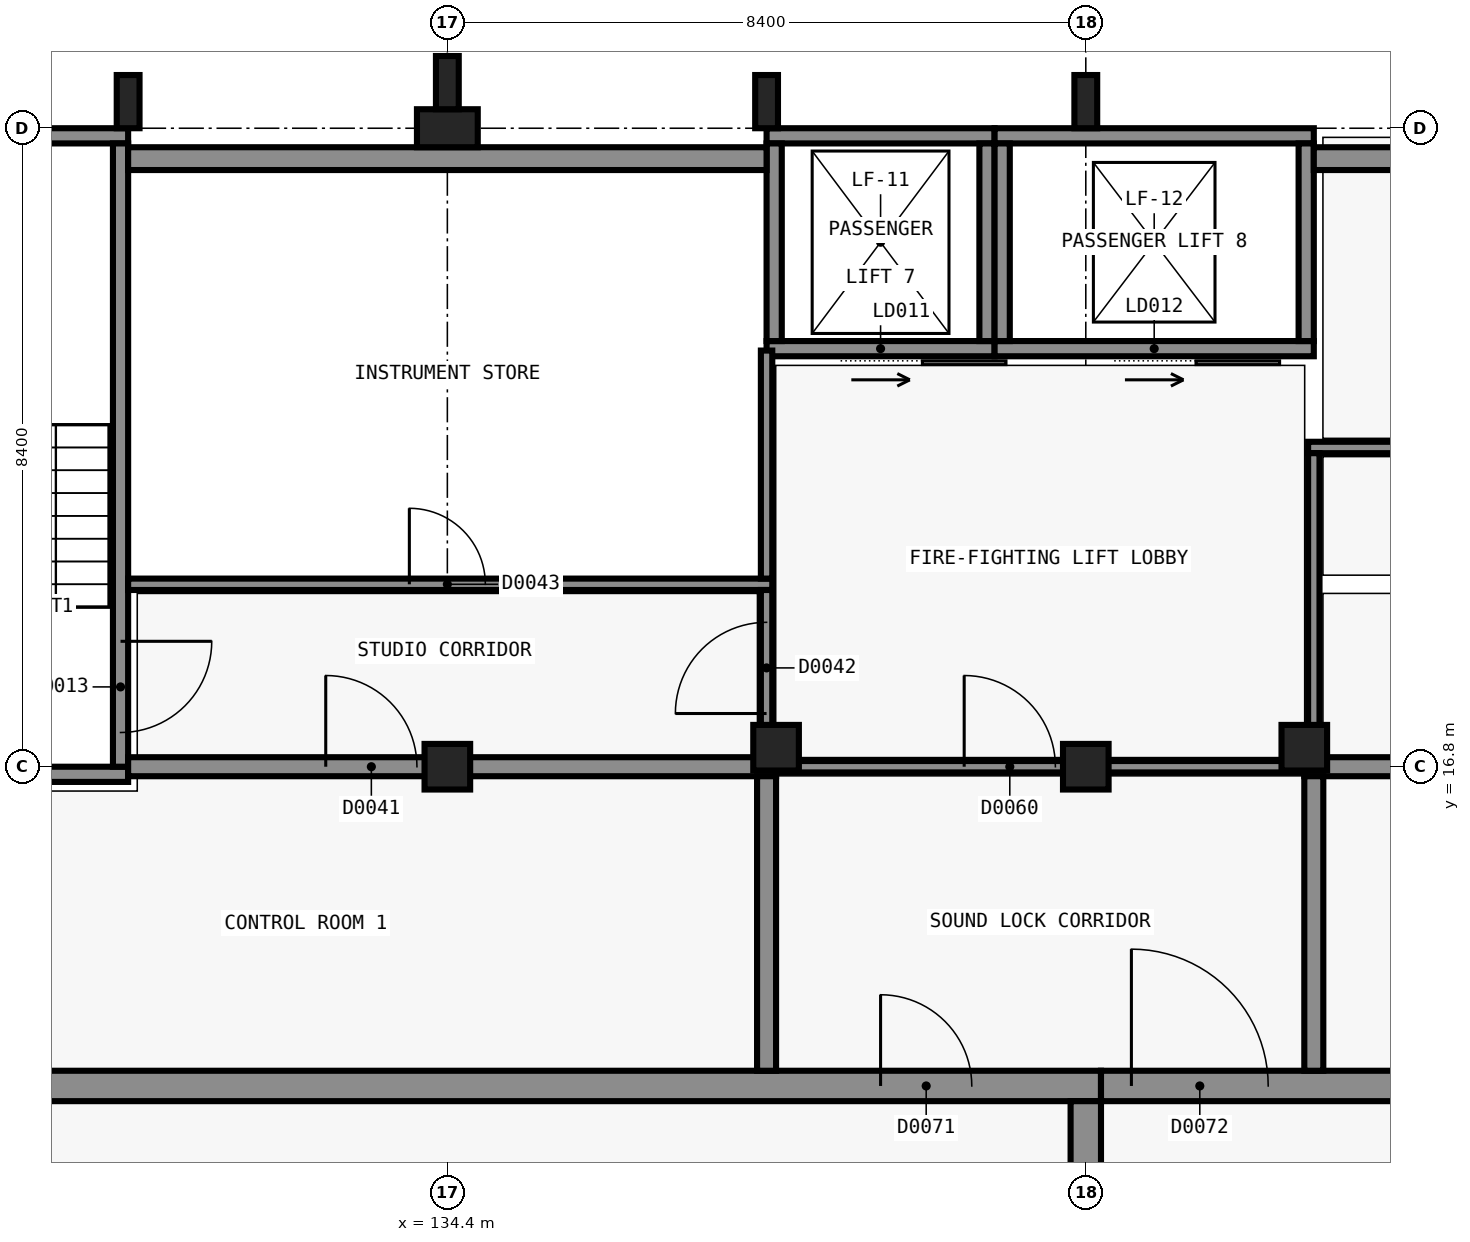
"""IFC4 building model, lengths in metres.
Left out: names, types, materials, properties, quantities, classifications, styles, units other than length and angle.
Written with IfcOpenShell. Run it as: python <this file> out.ifc"""

import sys

from ifc_helpers import new_model, si_unit, direction, frame, frame_2d, origin, origin_2d, place, context, subcontext, project, spatial, rectangle, extrude, element, fill, save


model = new_model("IFC4")
c1 = context("Model", 3, precision=1e-05, world=origin(), true_north=direction((0.0, 1.0)))
c2 = subcontext(c1, "Body", "Model", "MODEL_VIEW")
j1 = project(units=[si_unit("LENGTHUNIT", "METRE"), si_unit("PLANEANGLEUNIT", "RADIAN")], contexts=[c1])
p1 = place(None, origin())
s1 = spatial("IfcSite", under=j1, at=p1, CompositionType="ELEMENT")
p2 = place(p1, origin())
s2 = spatial("IfcBuilding", under=s1, at=p2, CompositionType="ELEMENT")
p3 = place(p2, origin())
s3 = spatial("IfcBuildingStorey", under=s2, at=p3, CompositionType="ELEMENT", Elevation=0.0)
p4 = place(p3, frame((130.2, 16.7, -0.3), z_axis=(0.0, 0.0, 1.0), x_axis=(-1.0, 0.0, 0.0)))
e1 = element("IfcWall", 1, at=p4, inside=s3, PredefinedType="SHEAR", context=c2, shape_type="SweptSolid", body=[
    extrude(rectangle(XDim=4.2, YDim=0.2, at=frame_2d((2.1, 0.0))), origin(), (0.0, 0.0, 1.0), 5.7),
])
p5 = place(p3, frame((126.0, 25.1, -0.3), z_axis=(0.0, 0.0, 1.0), x_axis=(1.0, 0.0, 0.0)))
e2 = element("IfcWall", 2, at=p5, inside=s3, PredefinedType="SHEAR", context=c2, shape_type="SweptSolid", body=[
    extrude(rectangle(XDim=4.2, YDim=0.2, at=frame_2d((2.1, 0.0))), origin(), (0.0, 0.0, 1.0), 5.7),
])
p6 = place(p5, frame((1.55, 0.0, 0.0)))
e3 = element("IfcOpeningElement", 3, at=p6, cuts=e2, PredefinedType="OPENING", context=c2, shape_type="SweptSolid", body=[
    extrude(rectangle(XDim=1.1, YDim=2.2, at=frame_2d((0.55, 1.1))), frame((0.0, 0.11, 0.0), z_axis=(0.0, -1.0, 0.0), x_axis=(1.0, 0.0, 0.0)), (0.0, 0.0, 1.0), 0.22),
])
p7 = place(p3, frame((130.1, 25.0, -0.3), z_axis=(0.0, 0.0, 1.0), x_axis=(0.0, -1.0, 0.0)))
e4 = element("IfcWall", 4, at=p7, inside=s3, PredefinedType="SHEAR", context=c2, shape_type="SweptSolid", body=[
    extrude(rectangle(XDim=8.2, YDim=0.2, at=frame_2d((4.1, 0.0))), origin(), (0.0, 0.0, 1.0), 5.7),
])
p8 = place(p7, frame((6.55, 0.0, 0.3)))
e5 = element("IfcOpeningElement", 5, at=p8, cuts=e4, PredefinedType="OPENING", context=c2, shape_type="SweptSolid", body=[
    extrude(rectangle(XDim=1.2, YDim=2.1, at=frame_2d((0.6, 1.05))), frame((0.0, 0.11, 0.0), z_axis=(0.0, -1.0, 0.0), x_axis=(1.0, 0.0, 0.0)), (0.0, 0.0, 1.0), 0.22),
])
p9 = place(p3, frame((141.6, 22.3, -1.6), z_axis=(0.0, 0.0, 1.0), x_axis=(-1.0, 0.0, 0.0)))
e6 = element("IfcWall", 6, at=p9, inside=s3, PredefinedType="SHEAR", context=c2, shape_type="SweptSolid", body=[
    extrude(rectangle(XDim=3.0, YDim=0.2, at=frame_2d((1.5, 0.0))), origin(), (0.0, 0.0, 1.0), 7.0),
])
p10 = place(p9, frame((0.95, 0.0, 1.6)))
e7 = element("IfcOpeningElement", 7, at=p10, cuts=e6, PredefinedType="OPENING", context=c2, shape_type="SweptSolid", body=[
    extrude(rectangle(XDim=1.1, YDim=2.1, at=frame_2d((0.55, 1.05))), frame((0.0, 0.11, 0.0), z_axis=(0.0, -1.0, 0.0), x_axis=(1.0, 0.0, 0.0)), (0.0, 0.0, 1.0), 0.22),
])
p11 = place(p3, frame((138.6, 25.1, -1.6), z_axis=(0.0, 0.0, 1.0), x_axis=(1.0, 0.0, 0.0)))
e8 = element("IfcWall", 8, at=p11, inside=s3, PredefinedType="SHEAR", context=c2, shape_type="SweptSolid", body=[
    extrude(rectangle(XDim=3.0, YDim=0.2, at=frame_2d((1.5, 0.0))), origin(), (0.0, 0.0, 1.0), 7.0),
])
for number, where, z_axis, x_axis in (
    (9, (138.7, 22.4, -1.6), (0.0, 0.0, 1.0), (0.0, 1.0, 0.0)),
    (10, (141.5, 25.0, -1.6), (0.0, 0.0, 1.0), (0.0, -1.0, 0.0)),
):
    element("IfcWall", number, at=place(p3, frame(where, z_axis=z_axis, x_axis=x_axis)), inside=s3, PredefinedType="SHEAR", context=c2, shape_type="SweptSolid", body=[
        extrude(rectangle(XDim=2.6, YDim=0.2, at=frame_2d((1.3, 0.0))), origin(), (0.0, 0.0, 1.0), 7.0),
    ])
p12 = place(p3, frame((145.8, 22.3, -1.6), z_axis=(0.0, 0.0, 1.0), x_axis=(-1.0, 0.0, 0.0)))
e11 = element("IfcWall", 11, at=p12, inside=s3, PredefinedType="SHEAR", context=c2, shape_type="SweptSolid", body=[
    extrude(rectangle(XDim=4.2, YDim=0.2, at=frame_2d((2.1, 0.0))), origin(), (0.0, 0.0, 1.0), 7.0),
])
p13 = place(p12, frame((1.55, 0.0, 1.6)))
e12 = element("IfcOpeningElement", 12, at=p13, cuts=e11, PredefinedType="OPENING", context=c2, shape_type="SweptSolid", body=[
    extrude(rectangle(XDim=1.1, YDim=2.1, at=frame_2d((0.55, 1.05))), frame((0.0, 0.11, 0.0), z_axis=(0.0, -1.0, 0.0), x_axis=(1.0, 0.0, 0.0)), (0.0, 0.0, 1.0), 0.22),
])
p14 = place(p3, frame((141.6, 25.1, -1.6), z_axis=(0.0, 0.0, 1.0), x_axis=(1.0, 0.0, 0.0)))
e13 = element("IfcWall", 13, at=p14, inside=s3, PredefinedType="SHEAR", context=c2, shape_type="SweptSolid", body=[
    extrude(rectangle(XDim=4.2, YDim=0.2, at=frame_2d((2.1, 0.0))), origin(), (0.0, 0.0, 1.0), 7.0),
])
for number, where, z_axis, x_axis in (
    (14, (141.7, 22.4, -1.6), (0.0, 0.0, 1.0), (0.0, 1.0, 0.0)),
    (15, (145.7, 25.0, -1.6), (0.0, 0.0, 1.0), (0.0, -1.0, 0.0)),
):
    element("IfcWall", number, at=place(p3, frame(where, z_axis=z_axis, x_axis=x_axis)), inside=s3, PredefinedType="SHEAR", context=c2, shape_type="SweptSolid", body=[
        extrude(rectangle(XDim=2.6, YDim=0.2, at=frame_2d((1.3, 0.0))), origin(), (0.0, 0.0, 1.0), 7.0),
    ])
p15 = place(p3, frame((126.0, 12.6, -0.3), z_axis=(0.0, 0.0, 1.0), x_axis=(1.0, 0.0, 0.0)))
e16 = element("IfcWall", 16, at=p15, inside=s3, PredefinedType="SHEAR", context=c2, shape_type="SweptSolid", body=[
    extrude(rectangle(XDim=17.0, YDim=0.4, at=frame_2d((8.5, 0.0))), origin(), (0.0, 0.0, 1.0), 5.7),
])
p16 = place(p15, frame((14.1, 0.0, 0.3)))
e17 = element("IfcOpeningElement", 17, at=p16, cuts=e16, PredefinedType="OPENING", context=c2, shape_type="SweptSolid", body=[
    extrude(rectangle(XDim=1.2, YDim=2.1, at=frame_2d((0.6, 1.05))), frame((0.0, 0.21, 0.0), z_axis=(0.0, -1.0, 0.0), x_axis=(1.0, 0.0, 0.0)), (0.0, 0.0, 1.0), 0.42),
])
p17 = place(p3, frame((142.8, 12.4, -0.3), z_axis=(0.0, 0.0, 1.0), x_axis=(0.0, -1.0, 0.0)))
e18 = element("IfcWall", 18, at=p17, inside=s3, PredefinedType="SHEAR", context=c2, shape_type="SweptSolid", body=[
    extrude(rectangle(XDim=12.0, YDim=0.4, at=frame_2d((6.0, 0.0))), origin(), (0.0, 0.0, 1.0), 5.7),
])
p18 = place(p3, frame((143.0, 12.6, -0.3), z_axis=(0.0, 0.0, 1.0), x_axis=(1.0, 0.0, 0.0)))
e19 = element("IfcWall", 19, at=p18, inside=s3, PredefinedType="SHEAR", context=c2, shape_type="SweptSolid", body=[
    extrude(rectangle(XDim=25.0, YDim=0.4, at=frame_2d((12.5, 0.0))), origin(), (0.0, 0.0, 1.0), 5.7),
])
p19 = place(p18, frame((0.4, 0.0, 0.3)))
e20 = element("IfcOpeningElement", 20, at=p19, cuts=e19, PredefinedType="OPENING", context=c2, shape_type="SweptSolid", body=[
    extrude(rectangle(XDim=1.8, YDim=2.3, at=frame_2d((0.9, 1.15))), frame((0.0, 0.21, 0.0), z_axis=(0.0, -1.0, 0.0), x_axis=(1.0, 0.0, 0.0)), (0.0, 0.0, 1.0), 0.42),
])
p20 = place(p3, frame((134.4, 16.8, -0.3), z_axis=(0.0, 0.0, 1.0), x_axis=(1.0, 0.0, 0.0)))
e21 = element("IfcColumn", 21, at=p20, inside=s3, PredefinedType="COLUMN", context=c2, shape_type="SweptSolid", body=[
    extrude(rectangle(XDim=0.6, YDim=0.6, at=origin_2d()), origin(), (0.0, 0.0, 1.0), 5.7),
])
p21 = place(p3, frame((134.4, 25.2, -0.3), z_axis=(0.0, 0.0, 1.0), x_axis=(1.0, 0.0, 0.0)))
e22 = element("IfcColumn", 22, at=p21, inside=s3, PredefinedType="COLUMN", context=c2, shape_type="SweptSolid", body=[
    extrude(rectangle(XDim=0.8, YDim=0.5, at=origin_2d()), origin(), (0.0, 0.0, 1.0), 5.7),
])
for number, where, z_axis, x_axis in (
    (23, (142.8, 16.8, -0.3), (0.0, 0.0, 1.0), (1.0, 0.0, 0.0)),
    (24, (138.725, 17.05, -0.3), (0.0, 0.0, 1.0), (1.0, 0.0, 0.0)),
    (25, (145.675, 17.05, -0.3), (0.0, 0.0, 1.0), (1.0, 0.0, 0.0)),
):
    element("IfcColumn", number, at=place(p3, frame(where, z_axis=z_axis, x_axis=x_axis)), inside=s3, PredefinedType="COLUMN", context=c2, shape_type="SweptSolid", body=[
        extrude(rectangle(XDim=0.6, YDim=0.6, at=origin_2d()), origin(), (0.0, 0.0, 1.0), 5.7),
    ])
p22 = place(p3, frame((130.2, 24.8, 0.0), z_axis=(0.0, 0.0, 1.0), x_axis=(1.0, 0.0, 0.0)))
e26 = element("IfcWall", 26, at=p22, inside=s3, PredefinedType="SOLIDWALL", context=c2, shape_type="SweptSolid", body=[
    extrude(rectangle(XDim=8.4, YDim=0.3, at=frame_2d((4.2, 0.0))), origin(), (0.0, 0.0, 1.0), 5.1),
])
p23 = place(p3, frame((145.8, 24.8, 0.0), z_axis=(0.0, 0.0, 1.0), x_axis=(1.0, 0.0, 0.0)))
e27 = element("IfcWall", 27, at=p23, inside=s3, PredefinedType="SOLIDWALL", context=c2, shape_type="SweptSolid", body=[
    extrude(rectangle(XDim=18.0, YDim=0.3, at=frame_2d((9.0, 0.0))), origin(), (0.0, 0.0, 1.0), 5.1),
])
p24 = place(p23, frame((10.2, 0.0, 0.0)))
e28 = element("IfcOpeningElement", 28, at=p24, cuts=e27, PredefinedType="OPENING", context=c2, shape_type="SweptSolid", body=[
    extrude(rectangle(XDim=2.4, YDim=2.4, at=frame_2d((1.2, 1.2))), frame((0.0, 0.16, 0.0), z_axis=(0.0, -1.0, 0.0), x_axis=(1.0, 0.0, 0.0)), (0.0, 0.0, 1.0), 0.32),
])
p25 = place(p23, frame((15.0, 0.0, 0.0)))
e29 = element("IfcOpeningElement", 29, at=p25, cuts=e27, PredefinedType="OPENING", context=c2, shape_type="SweptSolid", body=[
    extrude(rectangle(XDim=1.8, YDim=2.2, at=frame_2d((0.9, 1.1))), frame((0.0, 0.16, 0.0), z_axis=(0.0, -1.0, 0.0), x_axis=(1.0, 0.0, 0.0)), (0.0, 0.0, 1.0), 0.32),
])
p26 = place(p23, frame((2.7, 0.0, 1.5)))
e30 = element("IfcOpeningElement", 30, at=p26, cuts=e27, PredefinedType="OPENING", context=c2, shape_type="SweptSolid", body=[
    extrude(rectangle(XDim=1.2, YDim=0.9, at=frame_2d((0.6, 0.45))), frame((0.0, 0.16, 0.0), z_axis=(0.0, -1.0, 0.0), x_axis=(1.0, 0.0, 0.0)), (0.0, 0.0, 1.0), 0.32),
])
p27 = place(p23, frame((6.9, 0.0, 1.5)))
e31 = element("IfcOpeningElement", 31, at=p27, cuts=e27, PredefinedType="OPENING", context=c2, shape_type="SweptSolid", body=[
    extrude(rectangle(XDim=1.2, YDim=0.9, at=frame_2d((0.6, 0.45))), frame((0.0, 0.16, 0.0), z_axis=(0.0, -1.0, 0.0), x_axis=(1.0, 0.0, 0.0)), (0.0, 0.0, 1.0), 0.32),
])
for number, where, z_axis, x_axis in (
    (32, (130.2, 25.55, -0.3), (0.0, 0.0, 1.0), (1.0, 0.0, 0.0)),
    (33, (134.4, 25.8, -0.3), (0.0, 0.0, 1.0), (1.0, 0.0, 0.0)),
    (34, (138.6, 25.55, -0.3), (0.0, 0.0, 1.0), (1.0, 0.0, 0.0)),
    (35, (142.8, 25.55, -0.3), (0.0, 0.0, 1.0), (1.0, 0.0, 0.0)),
):
    element("IfcColumn", number, at=place(p3, frame(where, z_axis=z_axis, x_axis=x_axis)), inside=s3, PredefinedType="PILASTER", context=c2, shape_type="SweptSolid", body=[
        extrude(rectangle(XDim=0.3, YDim=0.7, at=origin_2d()), origin(), (0.0, 0.0, 1.0), 5.7),
    ])
p28 = place(p3, frame((130.2, 16.8, 0.0), z_axis=(0.0, 0.0, 1.0), x_axis=(1.0, 0.0, 0.0)))
e36 = element("IfcWall", 36, at=p28, inside=s3, PredefinedType="PARTITIONING", context=c2, shape_type="SweptSolid", body=[
    extrude(rectangle(XDim=8.525, YDim=0.25, at=frame_2d((4.263, 0.0))), origin(), (0.0, 0.0, 1.0), 4.4),
])
p29 = place(p28, frame((2.6, 0.0, 0.0)))
e37 = element("IfcOpeningElement", 37, at=p29, cuts=e36, PredefinedType="OPENING", context=c2, shape_type="SweptSolid", body=[
    extrude(rectangle(XDim=1.2, YDim=2.1, at=frame_2d((0.6, 1.05))), frame((0.0, 0.135, 0.0), z_axis=(0.0, -1.0, 0.0), x_axis=(1.0, 0.0, 0.0)), (0.0, 0.0, 1.0), 0.27),
])
p30 = place(p3, frame((145.675, 16.8, 0.0), z_axis=(0.0, 0.0, 1.0), x_axis=(1.0, 0.0, 0.0)))
e38 = element("IfcWall", 38, at=p30, inside=s3, PredefinedType="PARTITIONING", context=c2, shape_type="SweptSolid", body=[
    extrude(rectangle(XDim=12.25, YDim=0.25, at=frame_2d((6.125, 0.0))), origin(), (0.0, 0.0, 1.0), 4.4),
])
p31 = place(p30, frame((5.925, 0.0, 0.0)))
e39 = element("IfcOpeningElement", 39, at=p31, cuts=e38, PredefinedType="OPENING", context=c2, shape_type="SweptSolid", body=[
    extrude(rectangle(XDim=1.2, YDim=2.1, at=frame_2d((0.6, 1.05))), frame((0.0, 0.135, 0.0), z_axis=(0.0, -1.0, 0.0), x_axis=(1.0, 0.0, 0.0)), (0.0, 0.0, 1.0), 0.27),
])
for number, where, z_axis, x_axis in (
    (40, (138.6, 12.8, 0.0), (0.0, 0.0, 1.0), (0.0, 1.0, 0.0)),
    (41, (145.8, 12.8, 0.0), (0.0, 0.0, 1.0), (0.0, 1.0, 0.0)),
):
    element("IfcWall", number, at=place(p3, frame(where, z_axis=z_axis, x_axis=x_axis)), inside=s3, PredefinedType="PARTITIONING", context=c2, shape_type="SweptSolid", body=[
        extrude(rectangle(XDim=3.875, YDim=0.25, at=frame_2d((1.938, 0.0))), origin(), (0.0, 0.0, 1.0), 4.4),
    ])
p32 = place(p3, frame((130.2, 19.2, 0.0), z_axis=(0.0, 0.0, 1.0), x_axis=(1.0, 0.0, 0.0)))
e42 = element("IfcWall", 42, at=p32, inside=s3, PredefinedType="PARTITIONING", context=c2, shape_type="SweptSolid", body=[
    extrude(rectangle(XDim=8.475, YDim=0.15, at=frame_2d((4.237, 0.0))), origin(), (0.0, 0.0, 1.0), 4.4),
])
p33 = place(p32, frame((3.7, 0.0, 0.0)))
e43 = element("IfcOpeningElement", 43, at=p33, cuts=e42, PredefinedType="OPENING", context=c2, shape_type="SweptSolid", body=[
    extrude(rectangle(XDim=1.0, YDim=2.1, at=frame_2d((0.5, 1.05))), frame((0.0, 0.085, 0.0), z_axis=(0.0, -1.0, 0.0), x_axis=(1.0, 0.0, 0.0)), (0.0, 0.0, 1.0), 0.17),
])
p34 = place(p3, frame((145.725, 21.0, 0.0), z_axis=(0.0, 0.0, 1.0), x_axis=(1.0, 0.0, 0.0)))
e44 = element("IfcWall", 44, at=p34, inside=s3, PredefinedType="PARTITIONING", context=c2, shape_type="SweptSolid", body=[
    extrude(rectangle(XDim=9.75, YDim=0.15, at=frame_2d((4.875, 0.0))), origin(), (0.0, 0.0, 1.0), 4.4),
])
p35 = place(p34, frame((1.675, 0.0, 0.0)))
e45 = element("IfcOpeningElement", 45, at=p35, cuts=e44, PredefinedType="OPENING", context=c2, shape_type="SweptSolid", body=[
    extrude(rectangle(XDim=1.0, YDim=2.1, at=frame_2d((0.5, 1.05))), frame((0.0, 0.085, 0.0), z_axis=(0.0, -1.0, 0.0), x_axis=(1.0, 0.0, 0.0)), (0.0, 0.0, 1.0), 0.17),
])
p36 = place(p34, frame((5.0, 0.0, 0.0)))
e46 = element("IfcOpeningElement", 46, at=p36, cuts=e44, PredefinedType="OPENING", context=c2, shape_type="SweptSolid", body=[
    extrude(rectangle(XDim=1.0, YDim=2.1, at=frame_2d((0.5, 1.05))), frame((0.0, 0.085, 0.0), z_axis=(0.0, -1.0, 0.0), x_axis=(1.0, 0.0, 0.0)), (0.0, 0.0, 1.0), 0.17),
])
p37 = place(p3, frame((138.725, 16.8, 0.0), z_axis=(0.0, 0.0, 1.0), x_axis=(1.0, 0.0, 0.0)))
e47 = element("IfcWall", 47, at=p37, inside=s3, PredefinedType="SOLIDWALL", context=c2, shape_type="SweptSolid", body=[
    extrude(rectangle(XDim=6.95, YDim=0.15, at=frame_2d((3.475, 0.0))), origin(), (0.0, 0.0, 1.0), 4.4),
])
p38 = place(p37, frame((2.475, 0.0, 0.0)))
e48 = element("IfcOpeningElement", 48, at=p38, cuts=e47, PredefinedType="OPENING", context=c2, shape_type="SweptSolid", body=[
    extrude(rectangle(XDim=1.2, YDim=2.1, at=frame_2d((0.6, 1.05))), frame((0.0, 0.085, 0.0), z_axis=(0.0, -1.0, 0.0), x_axis=(1.0, 0.0, 0.0)), (0.0, 0.0, 1.0), 0.17),
])
p39 = place(p3, frame((138.6, 16.925, 0.0), z_axis=(0.0, 0.0, 1.0), x_axis=(0.0, 1.0, 0.0)))
e49 = element("IfcWall", 49, at=p39, inside=s3, PredefinedType="SOLIDWALL", context=c2, shape_type="SweptSolid", body=[
    extrude(rectangle(XDim=2.2, YDim=0.15, at=frame_2d((1.1, 0.0))), origin(), (0.0, 0.0, 1.0), 4.4),
])
p40 = place(p39, frame((0.575, 0.0, 0.0)))
e50 = element("IfcOpeningElement", 50, at=p40, cuts=e49, PredefinedType="OPENING", context=c2, shape_type="SweptSolid", body=[
    extrude(rectangle(XDim=1.2, YDim=2.1, at=frame_2d((0.6, 1.05))), frame((0.0, 0.085, 0.0), z_axis=(0.0, -1.0, 0.0), x_axis=(1.0, 0.0, 0.0)), (0.0, 0.0, 1.0), 0.17),
])
p41 = place(p3, frame((138.6, 19.275, 0.0), z_axis=(0.0, 0.0, 1.0), x_axis=(0.0, 1.0, 0.0)))
e51 = element("IfcWall", 51, at=p41, inside=s3, PredefinedType="SOLIDWALL", context=c2, shape_type="SweptSolid", body=[
    extrude(rectangle(XDim=3.0, YDim=0.15, at=frame_2d((1.5, 0.0))), origin(), (0.0, 0.0, 1.0), 5.1),
])
p42 = place(p3, frame((145.8, 16.925, 0.0), z_axis=(0.0, 0.0, 1.0), x_axis=(0.0, 1.0, 0.0)))
e52 = element("IfcWall", 52, at=p42, inside=s3, PredefinedType="SOLIDWALL", context=c2, shape_type="SweptSolid", body=[
    extrude(rectangle(XDim=4.0, YDim=0.15, at=frame_2d((2.0, 0.0))), origin(), (0.0, 0.0, 1.0), 4.4),
])
p43 = place(p10, origin())
e53 = element("IfcDoor", 53, at=p43, inside=s3, OperationType="SLIDING_TO_LEFT", PredefinedType="DOOR", context=c2, shape_type="SweptSolid", body=[
    extrude(rectangle(XDim=1.1, YDim=2.1, at=frame_2d((0.55, 1.05))), frame((0.0, 0.025, 0.0), z_axis=(0.0, -1.0, 0.0), x_axis=(1.0, 0.0, 0.0)), (0.0, 0.0, 1.0), 0.05),
])
fill(e7, e53)
p44 = place(p13, origin())
e54 = element("IfcDoor", 54, at=p44, inside=s3, OperationType="SLIDING_TO_LEFT", PredefinedType="DOOR", context=c2, shape_type="SweptSolid", body=[
    extrude(rectangle(XDim=1.1, YDim=2.1, at=frame_2d((0.55, 1.05))), frame((0.0, 0.025, 0.0), z_axis=(0.0, -1.0, 0.0), x_axis=(1.0, 0.0, 0.0)), (0.0, 0.0, 1.0), 0.05),
])
fill(e12, e54)
p45 = place(p8, origin())
e55 = element("IfcDoor", 55, at=p45, inside=s3, OperationType="SINGLE_SWING_LEFT", PredefinedType="DOOR", context=c2, shape_type="SweptSolid", body=[
    extrude(rectangle(XDim=1.2, YDim=2.1, at=frame_2d((0.6, 1.05))), frame((0.0, 0.025, 0.0), z_axis=(0.0, -1.0, 0.0), x_axis=(1.0, 0.0, 0.0)), (0.0, 0.0, 1.0), 0.05),
])
fill(e5, e55)
p46 = place(p29, origin())
e56 = element("IfcDoor", 56, at=p46, inside=s3, OperationType="SINGLE_SWING_LEFT", PredefinedType="DOOR", context=c2, shape_type="SweptSolid", body=[
    extrude(rectangle(XDim=1.2, YDim=2.1, at=frame_2d((0.6, 1.05))), frame((0.0, 0.025, 0.0), z_axis=(0.0, -1.0, 0.0), x_axis=(1.0, 0.0, 0.0)), (0.0, 0.0, 1.0), 0.05),
])
fill(e37, e56)
p47 = place(p40, origin())
e57 = element("IfcDoor", 57, at=p47, inside=s3, OperationType="SINGLE_SWING_RIGHT", PredefinedType="DOOR", context=c2, shape_type="SweptSolid", body=[
    extrude(rectangle(XDim=1.2, YDim=2.1, at=frame_2d((0.6, 1.05))), frame((0.0, 0.025, 0.0), z_axis=(0.0, -1.0, 0.0), x_axis=(1.0, 0.0, 0.0)), (0.0, 0.0, 1.0), 0.05),
])
fill(e50, e57)
p48 = place(p33, origin())
e58 = element("IfcDoor", 58, at=p48, inside=s3, OperationType="SINGLE_SWING_LEFT", PredefinedType="DOOR", context=c2, shape_type="SweptSolid", body=[
    extrude(rectangle(XDim=1.0, YDim=2.1, at=frame_2d((0.5, 1.05))), frame((0.0, 0.025, 0.0), z_axis=(0.0, -1.0, 0.0), x_axis=(1.0, 0.0, 0.0)), (0.0, 0.0, 1.0), 0.05),
])
fill(e43, e58)
p49 = place(p38, origin())
e59 = element("IfcDoor", 59, at=p49, inside=s3, OperationType="SINGLE_SWING_LEFT", PredefinedType="DOOR", context=c2, shape_type="SweptSolid", body=[
    extrude(rectangle(XDim=1.2, YDim=2.1, at=frame_2d((0.6, 1.05))), frame((0.0, 0.025, 0.0), z_axis=(0.0, -1.0, 0.0), x_axis=(1.0, 0.0, 0.0)), (0.0, 0.0, 1.0), 0.05),
])
fill(e48, e59)
p50 = place(p16, origin())
e60 = element("IfcDoor", 60, at=p50, inside=s3, OperationType="SINGLE_SWING_LEFT", PredefinedType="DOOR", context=c2, shape_type="SweptSolid", body=[
    extrude(rectangle(XDim=1.2, YDim=2.1, at=frame_2d((0.6, 1.05))), frame((0.0, 0.025, 0.0), z_axis=(0.0, -1.0, 0.0), x_axis=(1.0, 0.0, 0.0)), (0.0, 0.0, 1.0), 0.05),
])
fill(e17, e60)
p51 = place(p19, origin())
e61 = element("IfcDoor", 61, at=p51, inside=s3, OperationType="DOUBLE_DOOR_SINGLE_SWING", PredefinedType="DOOR", context=c2, shape_type="SweptSolid", body=[
    extrude(rectangle(XDim=1.8, YDim=2.3, at=frame_2d((0.9, 1.15))), frame((0.0, 0.025, 0.0), z_axis=(0.0, -1.0, 0.0), x_axis=(1.0, 0.0, 0.0)), (0.0, 0.0, 1.0), 0.05),
])
fill(e20, e61)
save(model, sys.argv[1])
